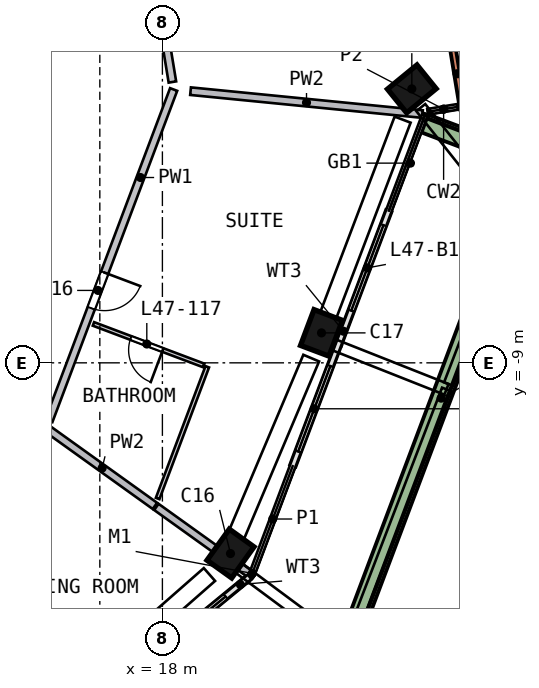
"""IFC4 building model, lengths in metres.
Left out: names, types, materials, properties, quantities, classifications, styles, units other than length and angle.
Written with IfcOpenShell. Run it as: python <this file> out.ifc"""

import sys

from ifc_helpers import new_model, si_unit, direction, frame, frame_2d, origin, origin_2d, place, context, subcontext, project, spatial, rectangle, extrude, element, fill, save


model = new_model("IFC4")
c1 = context("Model", 3, precision=1e-05, world=origin(), true_north=direction((0.0, 1.0)))
c2 = subcontext(c1, "Body", "Model", "MODEL_VIEW")
j1 = project(units=[si_unit("LENGTHUNIT", "METRE"), si_unit("PLANEANGLEUNIT", "RADIAN")], contexts=[c1])
p1 = place(None, origin())
s1 = spatial("IfcSite", under=j1, at=p1, CompositionType="ELEMENT")
p2 = place(p1, origin())
s2 = spatial("IfcBuilding", under=s1, at=p2, CompositionType="ELEMENT")
p3 = place(p2, frame((0.0, 0.0, 194.0)))
s3 = spatial("IfcBuildingStorey", under=s2, at=p3, CompositionType="ELEMENT", Elevation=194.0)
p4 = place(p3, frame((19.712, -14.133, 0.0), z_axis=(0.066444321, 0.094344854, 0.993319788), x_axis=(-0.578831594, -0.807241683, 0.11539)))
e1 = element("IfcColumn", 1, at=p4, inside=s3, PredefinedType="COLUMN", context=c2, shape_type="SweptSolid", body=[
    extrude(rectangle(XDim=1.0, YDim=0.8, at=origin_2d()), origin(), (0.0, 0.0, 1.0), 3.211),
])
p5 = place(p3, frame((22.14, -8.339, 0.0), z_axis=(0.038784697, 0.105631262, 0.993648722), x_axis=(0.350385276, 0.929821941, -0.112522514)))
e2 = element("IfcColumn", 2, at=p5, inside=s3, PredefinedType="COLUMN", context=c2, shape_type="SweptSolid", body=[
    extrude(rectangle(XDim=1.0, YDim=0.8, at=origin_2d()), origin(), (0.0, 0.0, 1.0), 3.21),
])
p6 = place(p3, frame((24.553, -1.933, 0.0), z_axis=(0.008284852, 0.116824008, 0.993118076), x_axis=(-0.775422304, -0.626335953, 0.0801469)))
e3 = element("IfcColumn", 3, at=p6, inside=s3, PredefinedType="COLUMN", context=c2, shape_type="SweptSolid", body=[
    extrude(rectangle(XDim=1.0, YDim=0.8, at=origin_2d()), origin(), (0.0, 0.0, 1.0), 3.212),
])
p7 = place(p3, frame((25.905, -2.318, 0.0), z_axis=(0.0, 0.0, 1.0), x_axis=(-0.162646024, 0.986684484, 0.0)))
e4 = element("IfcWall", 4, at=p7, inside=s3, PredefinedType="SOLIDWALL", context=c2, shape_type="SweptSolid", body=[
    extrude(rectangle(XDim=1.875, YDim=0.15, at=frame_2d((0.938, 0.0))), origin(), (0.0, 0.0, 1.0), 3.19),
])
p8 = place(p3, frame((17.495, -16.928, 0.0), z_axis=(0.0, 0.0, 1.0), x_axis=(0.773166937, 0.634202561, 0.0)))
e5 = element("IfcWall", 5, at=p8, inside=s3, PredefinedType="SOLIDWALL", context=c2, shape_type="SweptSolid", body=[
    extrude(rectangle(XDim=3.609, YDim=0.15, at=frame_2d((1.804, 0.0))), origin(), (0.0, 0.0, 1.0), 2.475),
])
p9 = place(p8, frame((0.4, 0.0, 0.0)))
e6 = element("IfcOpeningElement", 6, at=p9, cuts=e5, PredefinedType="OPENING", context=c2, shape_type="SweptSolid", body=[
    extrude(rectangle(XDim=2.4, YDim=2.4, at=frame_2d((1.2, 1.2))), frame((0.0, 0.085, 0.0), z_axis=(0.0, -1.0, 0.0), x_axis=(1.0, 0.0, 0.0)), (0.0, 0.0, 1.0), 0.17),
])
p10 = place(p3, frame((21.433, -11.706, 0.0), z_axis=(0.0, 0.0, 1.0), x_axis=(0.35248439, 0.935817693, 0.0)))
e7 = element("IfcWall", 7, at=p10, inside=s3, PredefinedType="SOLIDWALL", context=c2, shape_type="SweptSolid", body=[
    extrude(rectangle(XDim=3.4, YDim=0.15, at=frame_2d((1.7, 0.0))), origin(), (0.0, 0.0, 1.0), 2.475),
])
p11 = place(p10, frame((0.4, 0.0, 0.0)))
e8 = element("IfcOpeningElement", 8, at=p11, cuts=e7, PredefinedType="OPENING", context=c2, shape_type="SweptSolid", body=[
    extrude(rectangle(XDim=2.4, YDim=2.4, at=frame_2d((1.2, 1.2))), frame((0.0, 0.085, 0.0), z_axis=(0.0, -1.0, 0.0), x_axis=(1.0, 0.0, 0.0)), (0.0, 0.0, 1.0), 0.17),
])
p12 = place(p3, frame((22.631, -8.524, 0.0), z_axis=(0.0, 0.0, 1.0), x_axis=(0.352524386, 0.935802627, 0.0)))
e9 = element("IfcWall", 9, at=p12, inside=s3, PredefinedType="SOLIDWALL", context=c2, shape_type="SweptSolid", body=[
    extrude(rectangle(XDim=3.761, YDim=0.15, at=frame_2d((1.881, 0.0))), origin(), (0.0, 0.0, 1.0), 2.475),
])
p13 = place(p12, frame((0.961, 0.0, 0.0)))
e10 = element("IfcOpeningElement", 10, at=p13, cuts=e9, PredefinedType="OPENING", context=c2, shape_type="SweptSolid", body=[
    extrude(rectangle(XDim=2.4, YDim=2.4, at=frame_2d((1.2, 1.2))), frame((0.0, 0.085, 0.0), z_axis=(0.0, -1.0, 0.0), x_axis=(1.0, 0.0, 0.0)), (0.0, 0.0, 1.0), 0.17),
])
p14 = place(p3, frame((22.916, -16.351, 0.0), z_axis=(0.0, 0.0, 1.0), x_axis=(0.352493637, 0.93581421, 0.0)))
e11 = element("IfcWall", 11, at=p14, inside=s3, PredefinedType="SOLIDWALL", context=c2, shape_type="SweptSolid", body=[
    extrude(rectangle(XDim=13.723, YDim=0.5, at=frame_2d((6.862, 0.0))), origin(), (0.0, 0.0, 1.0), 0.7),
])
p15 = place(p3, frame((27.431, -3.654, 0.0), z_axis=(0.0, 0.0, 1.0), x_axis=(-0.935815205, 0.352490997, 0.0)))
e12 = element("IfcWall", 12, at=p15, inside=s3, PredefinedType="SOLIDWALL", context=c2, shape_type="SweptSolid", body=[
    extrude(rectangle(XDim=2.699, YDim=0.5, at=frame_2d((1.35, 0.0))), origin(), (0.0, 0.0, 1.0), 0.7),
])
p16 = place(p3, frame((18.296, -1.807, 0.0), z_axis=(0.0, 0.0, 1.0), x_axis=(-0.352510128, -0.935807998, 0.0)))
e13 = element("IfcWall", 13, at=p16, inside=s3, PredefinedType="SOLIDWALL", context=c2, shape_type="SweptSolid", body=[
    extrude(rectangle(XDim=9.317, YDim=0.2, at=frame_2d((4.658, 0.0))), origin(), (0.0, 0.0, 1.0), 3.19),
])
p17 = place(p16, frame((5.15, 0.0, 0.0)))
e14 = element("IfcOpeningElement", 14, at=p17, cuts=e13, PredefinedType="OPENING", context=c2, shape_type="SweptSolid", body=[
    extrude(rectangle(XDim=1.0, YDim=2.1, at=frame_2d((0.5, 1.05))), frame((0.0, 0.11, 0.0), z_axis=(0.0, -1.0, 0.0), x_axis=(1.0, 0.0, 0.0)), (0.0, 0.0, 1.0), 0.22),
])
p18 = place(p3, frame((16.748, 7.583, 0.0), z_axis=(0.0, 0.0, 1.0), x_axis=(0.162626714, -0.986687667, 0.0)))
e15 = element("IfcWall", 15, at=p18, inside=s3, PredefinedType="SOLIDWALL", context=c2, shape_type="SweptSolid", body=[
    extrude(rectangle(XDim=9.317, YDim=0.2, at=frame_2d((4.658, 0.0))), origin(), (0.0, 0.0, 1.0), 3.19),
])
p19 = place(p18, frame((3.869, 0.0, 0.0)))
e16 = element("IfcOpeningElement", 16, at=p19, cuts=e15, PredefinedType="OPENING", context=c2, shape_type="SweptSolid", body=[
    extrude(rectangle(XDim=1.8, YDim=2.1, at=frame_2d((0.9, 1.05))), frame((0.0, 0.11, 0.0), z_axis=(0.0, -1.0, 0.0), x_axis=(1.0, 0.0, 0.0)), (0.0, 0.0, 1.0), 0.22),
])
p20 = place(p3, frame((15.025, -10.773, 0.0), z_axis=(0.0, 0.0, 1.0), x_axis=(0.812680152, -0.582710023, 0.0)))
e17 = element("IfcWall", 17, at=p20, inside=s3, PredefinedType="SOLIDWALL", context=c2, shape_type="SweptSolid", body=[
    extrude(rectangle(XDim=3.418, YDim=0.2, at=frame_2d((1.709, 0.0))), origin(), (0.0, 0.0, 1.0), 3.19),
])
p21 = place(p3, frame((17.841, -12.792, 0.0), z_axis=(0.0, 0.0, 1.0), x_axis=(0.812658436, -0.582740307, 0.0)))
e18 = element("IfcWall", 18, at=p21, inside=s3, PredefinedType="SOLIDWALL", context=c2, shape_type="SweptSolid", body=[
    extrude(rectangle(XDim=3.011, YDim=0.2, at=frame_2d((1.506, 0.0))), origin(), (0.0, 0.0, 1.0), 3.19),
])
p22 = place(p3, frame((24.843, -2.453, 0.0), z_axis=(0.0, 0.0, 1.0), x_axis=(-0.995160973, 0.098258013, 0.0)))
e19 = element("IfcWall", 19, at=p22, inside=s3, PredefinedType="SOLIDWALL", context=c2, shape_type="SweptSolid", body=[
    extrude(rectangle(XDim=6.132, YDim=0.2, at=frame_2d((3.066, 0.0))), origin(), (0.0, 0.0, 1.0), 3.19),
])
p23 = place(p3, frame((15.289, -18.64, 0.0), z_axis=(0.0, 0.0, 1.0), x_axis=(-0.634214405, 0.773157221, 0.0)))
e20 = element("IfcWall", 20, at=p23, inside=s3, PredefinedType="PARTITIONING", context=c2, shape_type="SweptSolid", body=[
    extrude(rectangle(XDim=6.15, YDim=0.1, at=frame_2d((3.075, 0.0))), origin(), (0.0, 0.0, 1.0), 3.19),
])
p24 = place(p23, frame((1.8, 0.0, 0.0)))
e21 = element("IfcOpeningElement", 21, at=p24, cuts=e20, PredefinedType="OPENING", context=c2, shape_type="SweptSolid", body=[
    extrude(rectangle(XDim=1.0, YDim=2.1, at=frame_2d((0.5, 1.05))), frame((0.0, 0.06, 0.0), z_axis=(0.0, -1.0, 0.0), x_axis=(1.0, 0.0, 0.0)), (0.0, 0.0, 1.0), 0.12),
])
p25 = place(p3, frame((19.087, -9.068, 0.0), z_axis=(0.0, 0.0, 1.0), x_axis=(-0.935813585, 0.352495296, 0.0)))
e22 = element("IfcWall", 22, at=p25, inside=s3, PredefinedType="PARTITIONING", context=c2, shape_type="SweptSolid", body=[
    extrude(rectangle(XDim=3.1, YDim=0.1, at=frame_2d((1.55, 0.0))), origin(), (0.0, 0.0, 1.0), 3.19),
])
p26 = place(p25, frame((1.15, 0.0, 0.0)))
e23 = element("IfcOpeningElement", 23, at=p26, cuts=e22, PredefinedType="OPENING", context=c2, shape_type="SweptSolid", body=[
    extrude(rectangle(XDim=0.9, YDim=2.1, at=frame_2d((0.45, 1.05))), frame((0.0, 0.06, 0.0), z_axis=(0.0, -1.0, 0.0), x_axis=(1.0, 0.0, 0.0)), (0.0, 0.0, 1.0), 0.12),
])
p27 = place(p3, frame((19.18, -9.104, 0.0), z_axis=(0.0, 0.0, 1.0), x_axis=(-0.352517215, -0.935805329, 0.0)))
e24 = element("IfcWall", 24, at=p27, inside=s3, PredefinedType="PARTITIONING", context=c2, shape_type="SweptSolid", body=[
    extrude(rectangle(XDim=3.704, YDim=0.1, at=frame_2d((1.852, 0.0))), origin(), (0.0, 0.0, 1.0), 3.19),
])
p28 = place(p9, origin())
e25 = element("IfcDoor", 25, at=p28, inside=s3, OperationType="SLIDING_TO_RIGHT", PredefinedType="DOOR", context=c2, shape_type="SweptSolid", body=[
    extrude(rectangle(XDim=2.4, YDim=2.4, at=frame_2d((1.2, 1.2))), frame((0.0, 0.025, 0.0), z_axis=(0.0, -1.0, 0.0), x_axis=(1.0, 0.0, 0.0)), (0.0, 0.0, 1.0), 0.05),
])
fill(e6, e25)
p29 = place(p11, origin())
e26 = element("IfcDoor", 26, at=p29, inside=s3, OperationType="SLIDING_TO_RIGHT", PredefinedType="DOOR", context=c2, shape_type="SweptSolid", body=[
    extrude(rectangle(XDim=2.4, YDim=2.4, at=frame_2d((1.2, 1.2))), frame((0.0, 0.025, 0.0), z_axis=(0.0, -1.0, 0.0), x_axis=(1.0, 0.0, 0.0)), (0.0, 0.0, 1.0), 0.05),
])
fill(e8, e26)
p30 = place(p13, origin())
e27 = element("IfcDoor", 27, at=p30, inside=s3, OperationType="SLIDING_TO_LEFT", PredefinedType="DOOR", context=c2, shape_type="SweptSolid", body=[
    extrude(rectangle(XDim=2.4, YDim=2.4, at=frame_2d((1.2, 1.2))), frame((0.0, 0.025, 0.0), z_axis=(0.0, -1.0, 0.0), x_axis=(1.0, 0.0, 0.0)), (0.0, 0.0, 1.0), 0.05),
])
fill(e10, e27)
p31 = place(p17, origin())
e28 = element("IfcDoor", 28, at=p31, inside=s3, OperationType="SINGLE_SWING_LEFT", PredefinedType="DOOR", context=c2, shape_type="SweptSolid", body=[
    extrude(rectangle(XDim=1.0, YDim=2.1, at=frame_2d((0.5, 1.05))), frame((0.0, 0.025, 0.0), z_axis=(0.0, -1.0, 0.0), x_axis=(1.0, 0.0, 0.0)), (0.0, 0.0, 1.0), 0.05),
])
fill(e14, e28)
p32 = place(p26, origin())
e29 = element("IfcDoor", 29, at=p32, inside=s3, OperationType="SINGLE_SWING_LEFT", PredefinedType="DOOR", context=c2, shape_type="SweptSolid", body=[
    extrude(rectangle(XDim=0.9, YDim=2.1, at=frame_2d((0.45, 1.05))), frame((0.0, 0.025, 0.0), z_axis=(0.0, -1.0, 0.0), x_axis=(1.0, 0.0, 0.0)), (0.0, 0.0, 1.0), 0.05),
])
fill(e23, e29)
save(model, sys.argv[1])
